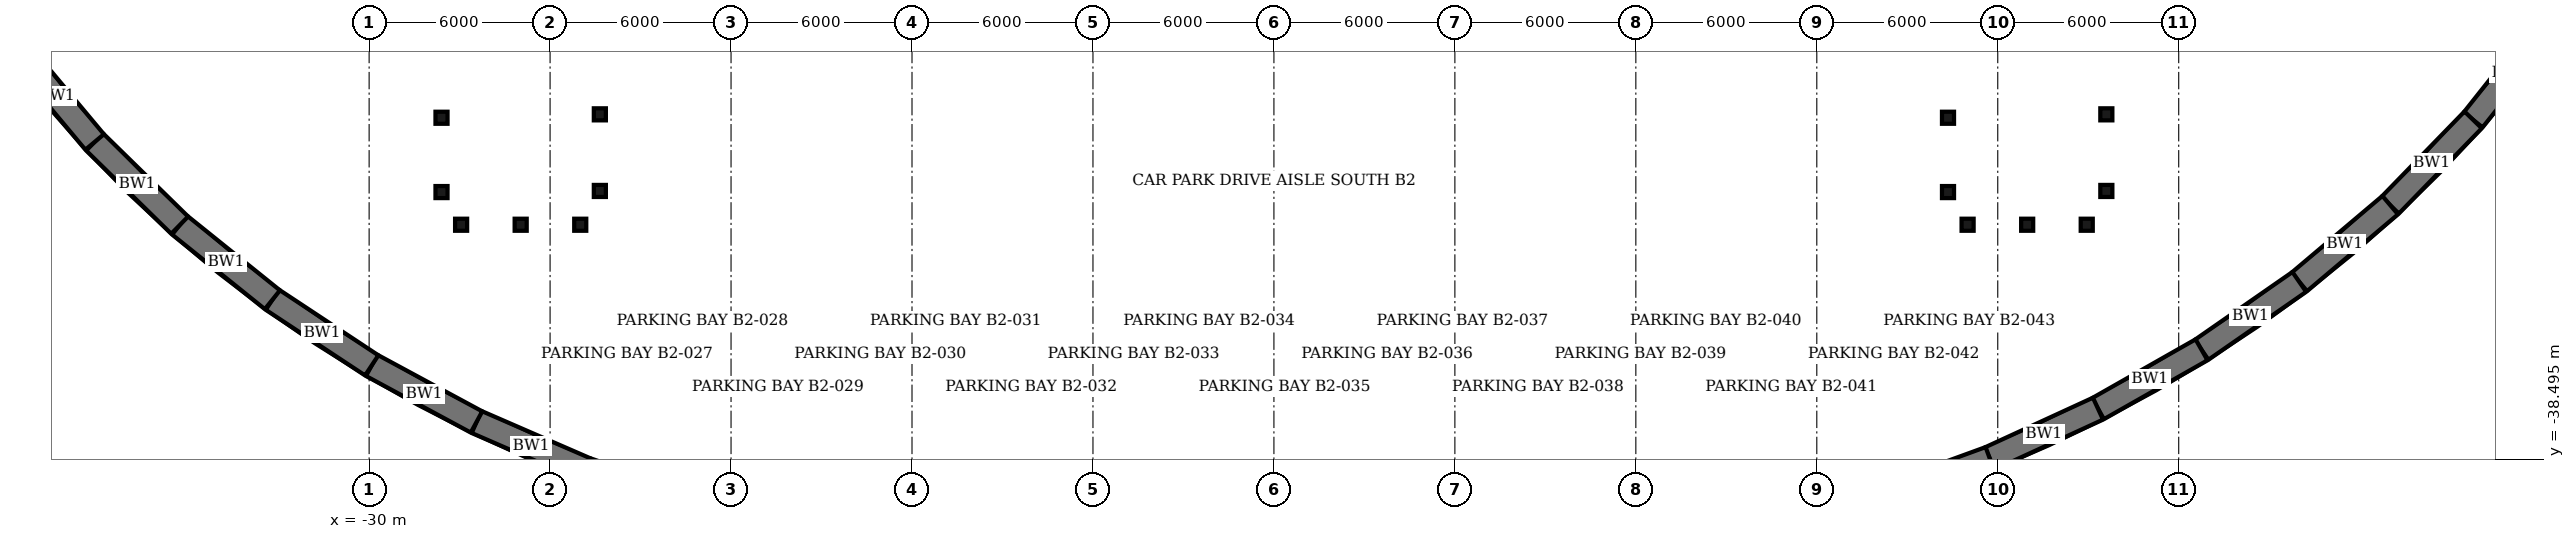
"""IFC4 building model, lengths in metres.
Left out: names, types, materials, properties, quantities, classifications, styles, units other than length and angle.
Written with IfcOpenShell. Run it as: python <this file> out.ifc"""

import sys

from ifc_helpers import new_model, si_unit, direction, frame, frame_2d, origin, origin_2d, place, context, subcontext, project, spatial, rectangle, extrude, element, save


model = new_model("IFC4")
c1 = context("Model", 3, precision=1e-05, world=origin(), true_north=direction((0.0, 1.0)))
c2 = subcontext(c1, "Body", "Model", "MODEL_VIEW")
j1 = project(units=[si_unit("LENGTHUNIT", "METRE"), si_unit("PLANEANGLEUNIT", "RADIAN")], contexts=[c1])
p1 = place(None, origin())
s1 = spatial("IfcSite", under=j1, at=p1, CompositionType="ELEMENT")
p2 = place(p1, origin())
s2 = spatial("IfcBuilding", under=s1, at=p2, CompositionType="ELEMENT")
p3 = place(p2, frame((0.0, 0.0, -10.5)))
s3 = spatial("IfcBuildingStorey", under=s2, at=p3, CompositionType="ELEMENT", Elevation=-10.5)
p4 = place(p3, frame((42.215, -24.147, 0.0), z_axis=(0.0, 0.0, 1.0), x_axis=(-0.622154611961, -0.782894398252, 0.0)))
e1 = element("IfcWall", 1, at=p4, inside=s3, PredefinedType="SOLIDWALL", context=c2, shape_type="SweptSolid", body=[
    extrude(rectangle(XDim=3.943, YDim=0.8, at=frame_2d((1.971, 0.0))), origin(), (0.0, 0.0, 1.0), 4.5),
])
p5 = place(p3, frame((39.762, -27.234, 0.0), z_axis=(0.0, 0.0, 1.0), x_axis=(-0.697258698396, -0.716819578074, 0.0)))
e2 = element("IfcWall", 2, at=p5, inside=s3, PredefinedType="SOLIDWALL", context=c2, shape_type="SweptSolid", body=[
    extrude(rectangle(XDim=3.944, YDim=0.8, at=frame_2d((1.972, 0.0))), origin(), (0.0, 0.0, 1.0), 4.5),
])
p6 = place(p3, frame((37.012, -30.061, 0.0), z_axis=(0.0, 0.0, 1.0), x_axis=(-0.764050254551, -0.645156731749, 0.0)))
e3 = element("IfcWall", 3, at=p6, inside=s3, PredefinedType="SOLIDWALL", context=c2, shape_type="SweptSolid", body=[
    extrude(rectangle(XDim=3.945, YDim=0.8, at=frame_2d((1.972, 0.0))), origin(), (0.0, 0.0, 1.0), 4.5),
])
p7 = place(p3, frame((33.998, -32.606, 0.0), z_axis=(0.0, 0.0, 1.0), x_axis=(-0.821333730516, -0.570447984584, 0.0)))
e4 = element("IfcWall", 4, at=p7, inside=s3, PredefinedType="SOLIDWALL", context=c2, shape_type="SweptSolid", body=[
    extrude(rectangle(XDim=3.946, YDim=0.8, at=frame_2d((1.973, 0.0))), origin(), (0.0, 0.0, 1.0), 4.5),
])
p8 = place(p3, frame((30.757, -34.857, 0.0), z_axis=(0.0, 0.0, 1.0), x_axis=(-0.869457764199, -0.494007283625, 0.0)))
e5 = element("IfcWall", 5, at=p8, inside=s3, PredefinedType="SOLIDWALL", context=c2, shape_type="SweptSolid", body=[
    extrude(rectangle(XDim=3.95, YDim=0.8, at=frame_2d((1.975, 0.0))), origin(), (0.0, 0.0, 1.0), 4.5),
])
p9 = place(p3, frame((27.323, -36.808, 0.0), z_axis=(0.0, 0.0, 1.0), x_axis=(-0.908595078456, -0.417678085858, 0.0)))
e6 = element("IfcWall", 6, at=p9, inside=s3, PredefinedType="SOLIDWALL", context=c2, shape_type="SweptSolid", body=[
    extrude(rectangle(XDim=3.95, YDim=0.8, at=frame_2d((1.975, 0.0))), origin(), (0.0, 0.0, 1.0), 4.5),
])
p10 = place(p3, frame((23.734, -38.458, 0.0), z_axis=(0.0, 0.0, 1.0), x_axis=(-0.939587666613, -0.342308364999, 0.0)))
e7 = element("IfcWall", 7, at=p10, inside=s3, PredefinedType="SOLIDWALL", context=c2, shape_type="SweptSolid", body=[
    extrude(rectangle(XDim=3.953, YDim=0.8, at=frame_2d((1.976, 0.0))), origin(), (0.0, 0.0, 1.0), 4.5),
])
p11 = place(p3, frame((-19.076, -40.105, 0.0), z_axis=(0.0, 0.0, 1.0), x_axis=(-0.946019018059, 0.324111119018, 0.0)))
e8 = element("IfcWall", 8, at=p11, inside=s3, PredefinedType="SOLIDWALL", context=c2, shape_type="SweptSolid", body=[
    extrude(rectangle(XDim=3.952, YDim=0.8, at=frame_2d((1.976, 0.0))), origin(), (0.0, 0.0, 1.0), 4.5),
])
p12 = place(p3, frame((-22.815, -38.824, 0.0), z_axis=(0.0, 0.0, 1.0), x_axis=(-0.917135856033, 0.398574737757, 0.0)))
e9 = element("IfcWall", 9, at=p12, inside=s3, PredefinedType="SOLIDWALL", context=c2, shape_type="SweptSolid", body=[
    extrude(rectangle(XDim=3.951, YDim=0.8, at=frame_2d((1.976, 0.0))), origin(), (0.0, 0.0, 1.0), 4.5),
])
p13 = place(p3, frame((-26.439, -37.249, 0.0), z_axis=(0.0, 0.0, 1.0), x_axis=(-0.879966388583, 0.475035951234, 0.0)))
e10 = element("IfcWall", 10, at=p13, inside=s3, PredefinedType="SOLIDWALL", context=c2, shape_type="SweptSolid", body=[
    extrude(rectangle(XDim=3.949, YDim=0.8, at=frame_2d((1.975, 0.0))), origin(), (0.0, 0.0, 1.0), 4.5),
])
p14 = place(p3, frame((-29.914, -35.373, 0.0), z_axis=(0.0, 0.0, 1.0), x_axis=(-0.834298741372, 0.551312624692, 0.0)))
e11 = element("IfcWall", 11, at=p14, inside=s3, PredefinedType="SOLIDWALL", context=c2, shape_type="SweptSolid", body=[
    extrude(rectangle(XDim=3.947, YDim=0.8, at=frame_2d((1.974, 0.0))), origin(), (0.0, 0.0, 1.0), 4.5),
])
p15 = place(p3, frame((-33.207, -33.197, 0.0), z_axis=(0.0, 0.0, 1.0), x_axis=(-0.779266654886, 0.626692492841, 0.0)))
e12 = element("IfcWall", 12, at=p15, inside=s3, PredefinedType="SOLIDWALL", context=c2, shape_type="SweptSolid", body=[
    extrude(rectangle(XDim=3.946, YDim=0.8, at=frame_2d((1.973, 0.0))), origin(), (0.0, 0.0, 1.0), 4.5),
])
p16 = place(p3, frame((-36.282, -30.724, 0.0), z_axis=(0.0, 0.0, 1.0), x_axis=(-0.714802407758, 0.699326474447, 0.0)))
e13 = element("IfcWall", 13, at=p16, inside=s3, PredefinedType="SOLIDWALL", context=c2, shape_type="SweptSolid", body=[
    extrude(rectangle(XDim=3.944, YDim=0.8, at=frame_2d((1.972, 0.0))), origin(), (0.0, 0.0, 1.0), 4.5),
])
p17 = place(p3, frame((-39.101, -27.966, 0.0), z_axis=(0.0, 0.0, 1.0), x_axis=(-0.641663169407, 0.766986555962, 0.0)))
e14 = element("IfcWall", 14, at=p17, inside=s3, PredefinedType="SOLIDWALL", context=c2, shape_type="SweptSolid", body=[
    extrude(rectangle(XDim=3.943, YDim=0.8, at=frame_2d((1.971, 0.0))), origin(), (0.0, 0.0, 1.0), 4.5),
])
for number, where, z_axis, x_axis in (
    (15, (27.6, -29.59, 0.0), (0.0, 0.0, 1.0), (1.0, 0.0, 0.0)),
    (16, (27.6, -27.05, 0.0), (0.0, 0.0, 1.0), (1.0, 0.0, 0.0)),
    (17, (22.35, -27.163, 0.0), (0.0, 0.0, 1.0), (1.0, 0.0, 0.0)),
    (18, (22.35, -29.627, 0.0), (0.0, 0.0, 1.0), (1.0, 0.0, 0.0)),
    (19, (-22.35, -29.59, 0.0), (0.0, 0.0, 1.0), (1.0, 0.0, 0.0)),
    (20, (-22.35, -27.05, 0.0), (0.0, 0.0, 1.0), (1.0, 0.0, 0.0)),
    (21, (-27.6, -27.163, 0.0), (0.0, 0.0, 1.0), (1.0, 0.0, 0.0)),
    (22, (-27.6, -29.627, 0.0), (0.0, 0.0, 1.0), (1.0, 0.0, 0.0)),
    (23, (26.95, -30.71, 0.0), (0.0, 0.0, 1.0), (1.0, 0.0, 0.0)),
    (24, (23.0, -30.71, 0.0), (0.0, 0.0, 1.0), (1.0, 0.0, 0.0)),
    (25, (24.975, -30.71, 0.0), (0.0, 0.0, 1.0), (1.0, 0.0, 0.0)),
    (26, (-23.0, -30.71, 0.0), (0.0, 0.0, 1.0), (1.0, 0.0, 0.0)),
    (27, (-26.95, -30.71, 0.0), (0.0, 0.0, 1.0), (1.0, 0.0, 0.0)),
    (28, (-24.975, -30.71, 0.0), (0.0, 0.0, 1.0), (1.0, 0.0, 0.0)),
):
    element("IfcColumn", number, at=place(p3, frame(where, z_axis=z_axis, x_axis=x_axis)), inside=s3, PredefinedType="COLUMN", context=c2, shape_type="SweptSolid", body=[
        extrude(rectangle(XDim=0.4, YDim=0.4, at=origin_2d()), origin(), (0.0, 0.0, 1.0), 4.5),
    ])
save(model, sys.argv[1])
